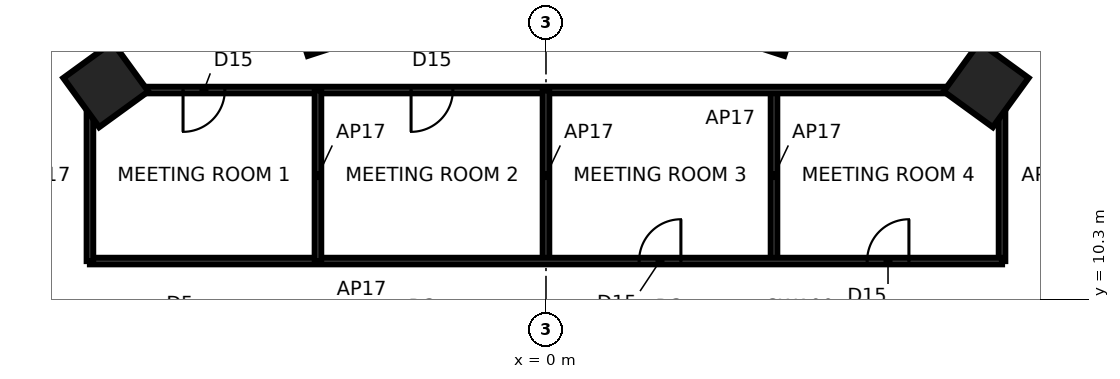
"""IFC4 building model, lengths in metres.
Left out: names, types, materials, properties, quantities, classifications, styles, units other than length and angle.
Written with IfcOpenShell. Run it as: python <this file> out.ifc"""

import sys

from ifc_helpers import new_model, si_unit, direction, frame, frame_2d, origin, origin_2d, place, context, subcontext, project, spatial, rectangle, extrude, element, fill, save


model = new_model("IFC4")
c1 = context("Model", 3, precision=1e-05, world=origin(), true_north=direction((0.0, 1.0)))
c2 = subcontext(c1, "Body", "Model", "MODEL_VIEW")
j1 = project(units=[si_unit("LENGTHUNIT", "METRE"), si_unit("PLANEANGLEUNIT", "RADIAN")], contexts=[c1])
p1 = place(None, origin())
s1 = spatial("IfcSite", under=j1, at=p1, CompositionType="ELEMENT")
p2 = place(p1, origin())
s2 = spatial("IfcBuilding", under=s1, at=p2, CompositionType="ELEMENT")
p3 = place(p2, frame((0.0, 0.0, 154.8)))
s3 = spatial("IfcBuildingStorey", under=s2, at=p3, CompositionType="ELEMENT", Elevation=154.8)
for number, where, z_axis, x_axis in (
    (1, (11.581, 15.94, 0.0), (0.0, 0.0, 1.0), (0.588, 0.809, 0.0)),
    (2, (5.754, 17.708, 0.0), (0.0, 0.0, 1.0), (0.309, 0.951, 0.0)),
    (3, (-5.754, 17.708, 0.0), (0.0, 0.0, 1.0), (-0.309, 0.951, 0.0)),
    (4, (-11.581, 15.94, 0.0), (0.0, 0.0, 1.0), (-0.588, 0.809, 0.0)),
):
    element("IfcColumn", number, at=place(p3, frame(where, z_axis=z_axis, x_axis=x_axis)), inside=s3, PredefinedType="COLUMN", context=c2, shape_type="SweptSolid", body=[
        extrude(rectangle(XDim=1.6, YDim=1.6, at=origin_2d()), origin(), (0.0, 0.0, 1.0), 3.9),
    ])
for number, where, z_axis, x_axis in (
    (5, (12.0, 15.8, 0.0), (0.0, 0.0, 1.0), (0.0, -1.0, 0.0)),
    (6, (6.0, 15.8, 0.0), (0.0, 0.0, 1.0), (0.0, -1.0, 0.0)),
):
    element("IfcWall", number, at=place(p3, frame(where, z_axis=z_axis, x_axis=x_axis)), inside=s3, PredefinedType="PARTITIONING", context=c2, shape_type="SweptSolid", body=[
        extrude(rectangle(XDim=4.5, YDim=0.17, at=frame_2d((2.25, 0.0))), origin(), (0.0, 0.0, 1.0), 3.74),
    ])
p4 = place(p3, frame((-12.0, 15.8, 0.0), z_axis=(0.0, 0.0, 1.0), x_axis=(1.0, 0.0, 0.0)))
e7 = element("IfcWall", 7, at=p4, inside=s3, PredefinedType="PARTITIONING", context=c2, shape_type="SweptSolid", body=[
    extrude(rectangle(XDim=24.0, YDim=0.17, at=frame_2d((12.0, 0.0))), origin(), (0.0, 0.0, 1.0), 3.74),
])
p5 = place(p4, frame((2.45, 0.0, 0.0)))
e8 = element("IfcOpeningElement", 8, at=p5, cuts=e7, PredefinedType="OPENING", context=c2, shape_type="SweptSolid", body=[
    extrude(rectangle(XDim=1.1, YDim=2.4, at=frame_2d((0.55, 1.2))), frame((0.0, 0.095, 0.0), z_axis=(0.0, -1.0, 0.0), x_axis=(1.0, 0.0, 0.0)), (0.0, 0.0, 1.0), 0.19),
])
p6 = place(p4, frame((8.45, 0.0, 0.0)))
e9 = element("IfcOpeningElement", 9, at=p6, cuts=e7, PredefinedType="OPENING", context=c2, shape_type="SweptSolid", body=[
    extrude(rectangle(XDim=1.1, YDim=2.4, at=frame_2d((0.55, 1.2))), frame((0.0, 0.095, 0.0), z_axis=(0.0, -1.0, 0.0), x_axis=(1.0, 0.0, 0.0)), (0.0, 0.0, 1.0), 0.19),
])
p7 = place(p3, frame((0.0, 15.8, 0.0), z_axis=(0.0, 0.0, 1.0), x_axis=(0.0, -1.0, 0.0)))
e10 = element("IfcWall", 10, at=p7, inside=s3, PredefinedType="PARTITIONING", context=c2, shape_type="SweptSolid", body=[
    extrude(rectangle(XDim=4.5, YDim=0.17, at=frame_2d((2.25, 0.0))), origin(), (0.0, 0.0, 1.0), 2.94),
])
p8 = place(p3, frame((12.0, 11.3, 0.0), z_axis=(0.0, 0.0, 1.0), x_axis=(-1.0, 0.0, 0.0)))
e11 = element("IfcWall", 11, at=p8, inside=s3, PredefinedType="PARTITIONING", context=c2, shape_type="SweptSolid", body=[
    extrude(rectangle(XDim=24.0, YDim=0.17, at=frame_2d((12.0, 0.0))), origin(), (0.0, 0.0, 1.0), 3.74),
])
p9 = place(p8, frame((8.45, 0.0, 0.0)))
e12 = element("IfcOpeningElement", 12, at=p9, cuts=e11, PredefinedType="OPENING", context=c2, shape_type="SweptSolid", body=[
    extrude(rectangle(XDim=1.1, YDim=2.4, at=frame_2d((0.55, 1.2))), frame((0.0, 0.095, 0.0), z_axis=(0.0, -1.0, 0.0), x_axis=(1.0, 0.0, 0.0)), (0.0, 0.0, 1.0), 0.19),
])
p10 = place(p8, frame((2.45, 0.0, 0.0)))
e13 = element("IfcOpeningElement", 13, at=p10, cuts=e11, PredefinedType="OPENING", context=c2, shape_type="SweptSolid", body=[
    extrude(rectangle(XDim=1.1, YDim=2.4, at=frame_2d((0.55, 1.2))), frame((0.0, 0.095, 0.0), z_axis=(0.0, -1.0, 0.0), x_axis=(1.0, 0.0, 0.0)), (0.0, 0.0, 1.0), 0.19),
])
for number, where, z_axis, x_axis in (
    (14, (-6.0, 15.8, 0.0), (0.0, 0.0, 1.0), (0.0, -1.0, 0.0)),
    (15, (-12.0, 11.3, 0.0), (0.0, 0.0, 1.0), (0.0, 1.0, 0.0)),
):
    element("IfcWall", number, at=place(p3, frame(where, z_axis=z_axis, x_axis=x_axis)), inside=s3, PredefinedType="PARTITIONING", context=c2, shape_type="SweptSolid", body=[
        extrude(rectangle(XDim=4.5, YDim=0.17, at=frame_2d((2.25, 0.0))), origin(), (0.0, 0.0, 1.0), 3.74),
    ])
p11 = place(p5, frame((1.1, 0.0, 0.0), z_axis=(0.0, 0.0, 1.0), x_axis=(-1.0, 0.0, 0.0)))
e16 = element("IfcDoor", 16, at=p11, inside=s3, OperationType="SINGLE_SWING_RIGHT", PredefinedType="DOOR", context=c2, shape_type="SweptSolid", body=[
    extrude(rectangle(XDim=1.1, YDim=2.4, at=frame_2d((0.55, 1.2))), frame((0.0, 0.025, 0.0), z_axis=(0.0, -1.0, 0.0), x_axis=(1.0, 0.0, 0.0)), (0.0, 0.0, 1.0), 0.05),
])
fill(e8, e16)
p12 = place(p6, frame((1.1, 0.0, 0.0), z_axis=(0.0, 0.0, 1.0), x_axis=(-1.0, 0.0, 0.0)))
e17 = element("IfcDoor", 17, at=p12, inside=s3, OperationType="SINGLE_SWING_RIGHT", PredefinedType="DOOR", context=c2, shape_type="SweptSolid", body=[
    extrude(rectangle(XDim=1.1, YDim=2.4, at=frame_2d((0.55, 1.2))), frame((0.0, 0.025, 0.0), z_axis=(0.0, -1.0, 0.0), x_axis=(1.0, 0.0, 0.0)), (0.0, 0.0, 1.0), 0.05),
])
fill(e9, e17)
p13 = place(p9, frame((1.1, 0.0, 0.0), z_axis=(0.0, 0.0, 1.0), x_axis=(-1.0, 0.0, 0.0)))
e18 = element("IfcDoor", 18, at=p13, inside=s3, OperationType="SINGLE_SWING_RIGHT", PredefinedType="DOOR", context=c2, shape_type="SweptSolid", body=[
    extrude(rectangle(XDim=1.1, YDim=2.4, at=frame_2d((0.55, 1.2))), frame((0.0, 0.025, 0.0), z_axis=(0.0, -1.0, 0.0), x_axis=(1.0, 0.0, 0.0)), (0.0, 0.0, 1.0), 0.05),
])
fill(e12, e18)
p14 = place(p10, frame((1.1, 0.0, 0.0), z_axis=(0.0, 0.0, 1.0), x_axis=(-1.0, 0.0, 0.0)))
e19 = element("IfcDoor", 19, at=p14, inside=s3, OperationType="SINGLE_SWING_RIGHT", PredefinedType="DOOR", context=c2, shape_type="SweptSolid", body=[
    extrude(rectangle(XDim=1.1, YDim=2.4, at=frame_2d((0.55, 1.2))), frame((0.0, 0.025, 0.0), z_axis=(0.0, -1.0, 0.0), x_axis=(1.0, 0.0, 0.0)), (0.0, 0.0, 1.0), 0.05),
])
fill(e13, e19)
save(model, sys.argv[1])
